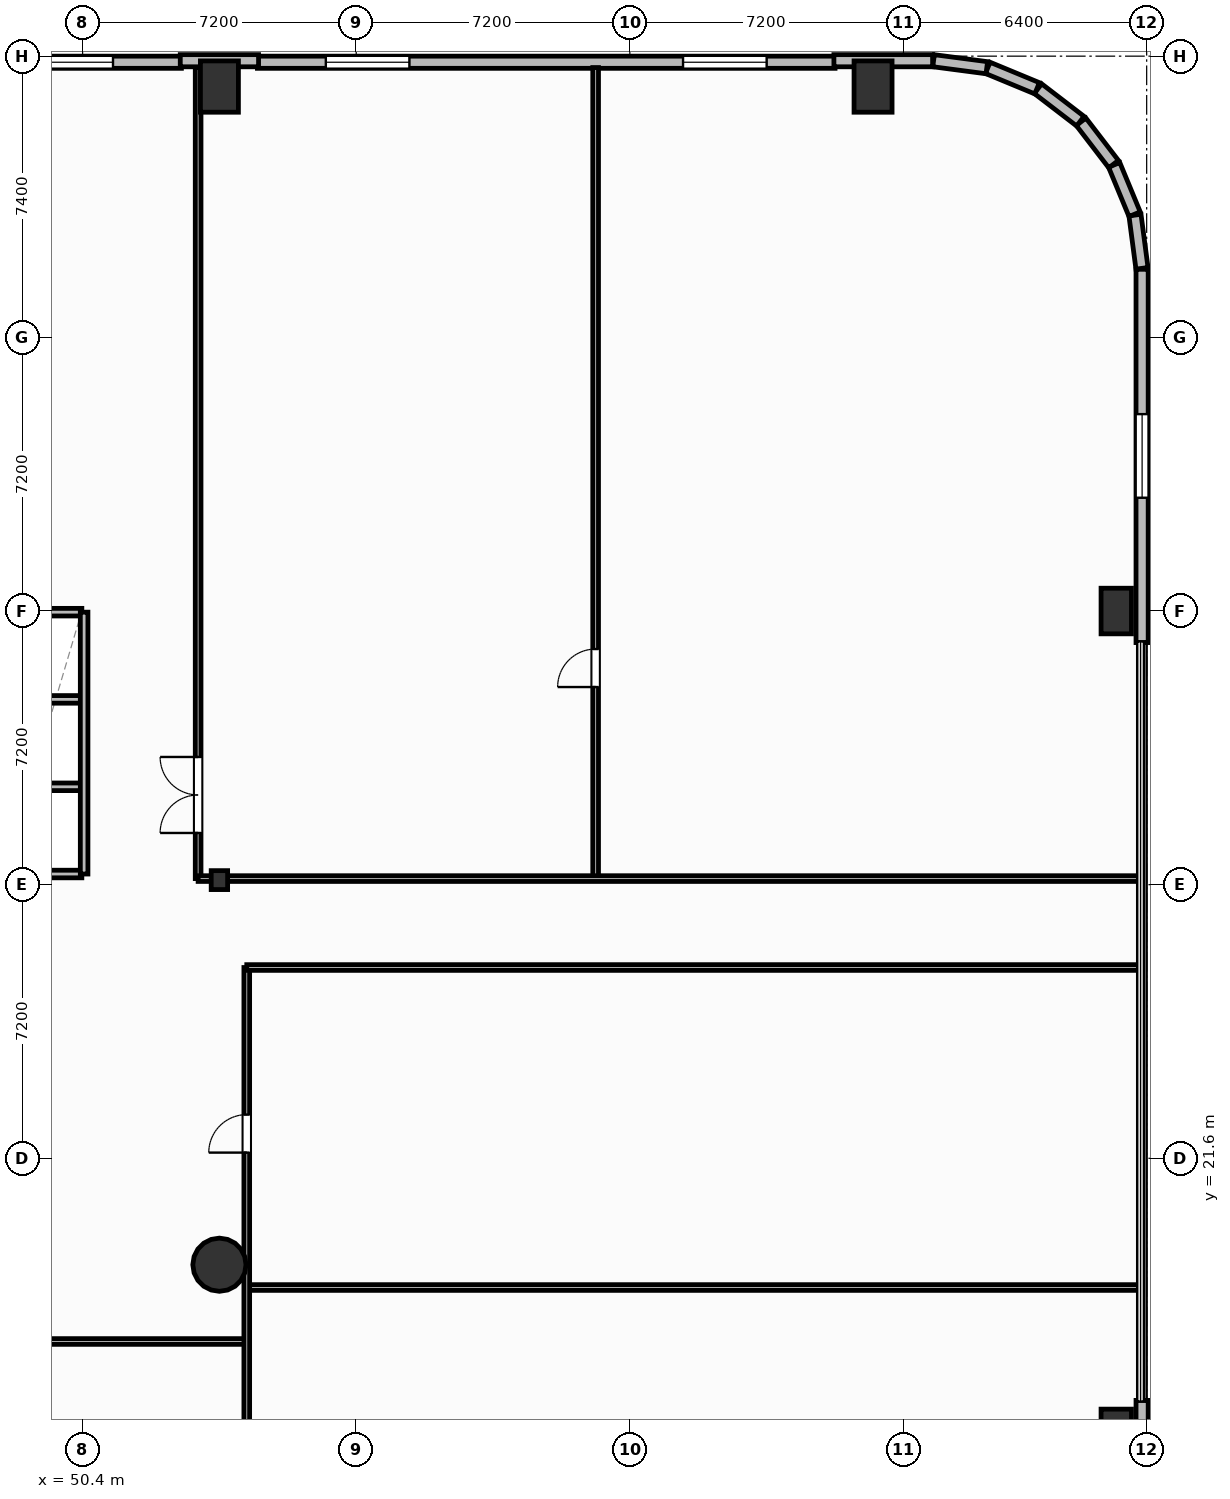
"""IFC4 building model, lengths in metres.
Left out: names, types, materials, properties, quantities, classifications, styles, units other than length and angle.
Written with IfcOpenShell. Run it as: python <this file> out.ifc"""

import sys

from ifc_helpers import new_model, si_unit, direction, frame, frame_2d, origin, origin_2d, place, context, subcontext, project, spatial, rectangle, circle, i_section, extrude, element, fill, save


model = new_model("IFC4")
c1 = context("Model", 3, precision=1e-05, world=origin(), true_north=direction((0.0, 1.0)))
c2 = subcontext(c1, "Body", "Model", "MODEL_VIEW")
j1 = project(units=[si_unit("LENGTHUNIT", "METRE"), si_unit("PLANEANGLEUNIT", "RADIAN")], contexts=[c1])
p1 = place(None, origin())
s1 = spatial("IfcSite", under=j1, at=p1, CompositionType="ELEMENT")
p2 = place(p1, origin())
s2 = spatial("IfcBuilding", under=s1, at=p2, CompositionType="ELEMENT")
p3 = place(p2, frame((0.0, 0.0, 21.6)))
s3 = spatial("IfcBuildingStorey", under=s2, at=p3, CompositionType="ELEMENT", Elevation=21.6)
p4 = place(p3, frame((54.0, 28.92, 0.0), z_axis=(0.0, 0.0, 1.0), x_axis=(1.0, 0.0, 0.0)))
e1 = element("IfcColumn", 1, at=p4, inside=s3, PredefinedType="COLUMN", context=c2, shape_type="SweptSolid", body=[
    extrude(i_section(OverallWidth=0.432, OverallDepth=0.498, WebThickness=0.056, FlangeThickness=0.089, FilletRadius=0.025, at=origin_2d()), origin(), (0.0, 0.0, 1.0), 5.4),
])
p5 = place(p3, frame((54.0, 18.8, 0.0), z_axis=(0.0, 0.0, 1.0), x_axis=(1.0, 0.0, 0.0)))
e2 = element("IfcColumn", 2, at=p5, inside=s3, PredefinedType="COLUMN", context=c2, shape_type="SweptSolid", body=[
    extrude(circle(Radius=0.7, at=origin_2d()), origin(), (0.0, 0.0, 1.0), 5.4),
])
for number, where, z_axis, x_axis in (
    (3, (54.0, 49.8, 0.0), (0.0, 0.0, 1.0), (1.0, 0.0, 0.0)),
    (4, (71.2, 49.8, 0.0), (0.0, 0.0, 1.0), (1.0, 0.0, 0.0)),
):
    element("IfcColumn", number, at=place(p3, frame(where, z_axis=z_axis, x_axis=x_axis)), inside=s3, PredefinedType="COLUMN", context=c2, shape_type="SweptSolid", body=[
        extrude(rectangle(XDim=1.0, YDim=1.35, at=origin_2d()), origin(), (0.0, 0.0, 1.0), 5.4),
    ])
for number, where, z_axis, x_axis in (
    (5, (77.6, 14.4, 0.0), (0.0, 0.0, 1.0), (1.0, 0.0, 0.0)),
    (6, (77.6, 36.0, 0.0), (0.0, 0.0, 1.0), (1.0, 0.0, 0.0)),
):
    element("IfcColumn", number, at=place(p3, frame(where, z_axis=z_axis, x_axis=x_axis)), inside=s3, PredefinedType="PILASTER", context=c2, shape_type="SweptSolid", body=[
        extrude(rectangle(XDim=0.8, YDim=1.2, at=origin_2d()), origin(), (0.0, 0.0, 1.0), 5.4),
    ])
p6 = place(p3, frame((25.4, 50.44, 0.0), z_axis=(0.0, 0.0, 1.0), x_axis=(1.0, 0.0, 0.0)))
e7 = element("IfcWall", 7, at=p6, inside=s3, PredefinedType="SOLIDWALL", context=c2, shape_type="SweptSolid", body=[
    extrude(rectangle(XDim=27.6, YDim=0.32, at=frame_2d((13.8, 0.0))), origin(), (0.0, 0.0, 1.0), 4.1),
])
p7 = place(p6, frame((1.8, 0.0, 0.8)))
e8 = element("IfcOpeningElement", 8, at=p7, cuts=e7, PredefinedType="OPENING", context=c2, shape_type="SweptSolid", body=[
    extrude(rectangle(XDim=2.2, YDim=1.11, at=frame_2d((1.1, 0.555))), frame((0.0, 0.17, 0.0), z_axis=(0.0, -1.0, 0.0), x_axis=(1.0, 0.0, 0.0)), (0.0, 0.0, 1.0), 0.34),
])
p8 = place(p6, frame((23.6, 0.0, 0.8)))
e9 = element("IfcOpeningElement", 9, at=p8, cuts=e7, PredefinedType="OPENING", context=c2, shape_type="SweptSolid", body=[
    extrude(rectangle(XDim=2.2, YDim=1.11, at=frame_2d((1.1, 0.555))), frame((0.0, 0.17, 0.0), z_axis=(0.0, -1.0, 0.0), x_axis=(1.0, 0.0, 0.0)), (0.0, 0.0, 1.0), 0.34),
])
p9 = place(p3, frame((55.0, 50.44, 0.0), z_axis=(0.0, 0.0, 1.0), x_axis=(1.0, 0.0, 0.0)))
e10 = element("IfcWall", 10, at=p9, inside=s3, PredefinedType="SOLIDWALL", context=c2, shape_type="SweptSolid", body=[
    extrude(rectangle(XDim=15.2, YDim=0.32, at=frame_2d((7.6, 0.0))), origin(), (0.0, 0.0, 1.0), 4.1),
])
p10 = place(p9, frame((1.8, 0.0, 0.8)))
e11 = element("IfcOpeningElement", 11, at=p10, cuts=e10, PredefinedType="OPENING", context=c2, shape_type="SweptSolid", body=[
    extrude(rectangle(XDim=2.2, YDim=1.11, at=frame_2d((1.1, 0.555))), frame((0.0, 0.17, 0.0), z_axis=(0.0, -1.0, 0.0), x_axis=(1.0, 0.0, 0.0)), (0.0, 0.0, 1.0), 0.34),
])
p11 = place(p9, frame((11.2, 0.0, 0.8)))
e12 = element("IfcOpeningElement", 12, at=p11, cuts=e10, PredefinedType="OPENING", context=c2, shape_type="SweptSolid", body=[
    extrude(rectangle(XDim=2.2, YDim=1.11, at=frame_2d((1.1, 0.555))), frame((0.0, 0.17, 0.0), z_axis=(0.0, -1.0, 0.0), x_axis=(1.0, 0.0, 0.0)), (0.0, 0.0, 1.0), 0.34),
])
p12 = place(p3, frame((78.28, 5.633, 0.0), z_axis=(0.0, 0.0, 1.0), x_axis=(0.0, 1.0, 0.0)))
e13 = element("IfcWall", 13, at=p12, inside=s3, PredefinedType="SOLIDWALL", context=c2, shape_type="SweptSolid", body=[
    extrude(rectangle(XDim=9.597, YDim=0.32, at=frame_2d((4.799, 0.0))), origin(), (0.0, 0.0, 1.0), 4.1),
])
p13 = place(p12, frame((3.698, 0.0, 0.8)))
e14 = element("IfcOpeningElement", 14, at=p13, cuts=e13, PredefinedType="OPENING", context=c2, shape_type="SweptSolid", body=[
    extrude(rectangle(XDim=2.2, YDim=2.0, at=frame_2d((1.1, 1.0))), frame((0.0, 0.17, 0.0), z_axis=(0.0, -1.0, 0.0), x_axis=(1.0, 0.0, 0.0)), (0.0, 0.0, 1.0), 0.34),
])
p14 = place(p3, frame((78.28, 35.17, 0.0), z_axis=(0.0, 0.0, 1.0), x_axis=(0.0, 1.0, 0.0)))
e15 = element("IfcWall", 15, at=p14, inside=s3, PredefinedType="SOLIDWALL", context=c2, shape_type="SweptSolid", body=[
    extrude(rectangle(XDim=9.822, YDim=0.32, at=frame_2d((4.911, 0.0))), origin(), (0.0, 0.0, 1.0), 4.1),
])
p15 = place(p14, frame((3.811, 0.0, 0.8)))
e16 = element("IfcOpeningElement", 16, at=p15, cuts=e15, PredefinedType="OPENING", context=c2, shape_type="SweptSolid", body=[
    extrude(rectangle(XDim=2.2, YDim=2.0, at=frame_2d((1.1, 1.0))), frame((0.0, 0.17, 0.0), z_axis=(0.0, -1.0, 0.0), x_axis=(1.0, 0.0, 0.0)), (0.0, 0.0, 1.0), 0.34),
])
p16 = place(p3, frame((78.277, 45.017, 0.0), z_axis=(0.0, 0.0, 1.0), x_axis=(-0.130409831203, 0.991460173646, 0.0)))
e17 = element("IfcWall", 17, at=p16, inside=s3, PredefinedType="SOLIDWALL", context=c2, shape_type="SweptSolid", body=[
    extrude(rectangle(XDim=1.413, YDim=0.32, at=frame_2d((0.707, 0.0))), origin(), (0.0, 0.0, 1.0), 4.1),
])
for number, where, z_axis, x_axis in (
    (18, (78.083, 46.441, 0.0), (0.0, 0.0, 1.0), (-0.383, 0.924, 0.0)),
    (19, (77.53, 47.759, 0.0), (0.0, 0.0, 1.0), (-0.609, 0.793, 0.0)),
    (20, (76.654, 48.889, 0.0), (0.0, 0.0, 1.0), (-0.793, 0.609, 0.0)),
    (21, (75.516, 49.754, 0.0), (0.0, 0.0, 1.0), (-0.924, 0.383, 0.0)),
):
    element("IfcWall", number, at=place(p3, frame(where, z_axis=z_axis, x_axis=x_axis)), inside=s3, PredefinedType="SOLIDWALL", context=c2, shape_type="SweptSolid", body=[
        extrude(rectangle(XDim=1.405, YDim=0.32, at=frame_2d((0.703, 0.0))), origin(), (0.0, 0.0, 1.0), 4.1),
    ])
p17 = place(p3, frame((74.193, 50.296, 0.0), z_axis=(0.0, 0.0, 1.0), x_axis=(-0.991460173646, 0.130409831203, 0.0)))
e22 = element("IfcWall", 22, at=p17, inside=s3, PredefinedType="SOLIDWALL", context=c2, shape_type="SweptSolid", body=[
    extrude(rectangle(XDim=1.413, YDim=0.32, at=frame_2d((0.707, 0.0))), origin(), (0.0, 0.0, 1.0), 4.1),
])
p18 = place(p3, frame((72.767, 50.48, 0.0), z_axis=(0.0, 0.0, 1.0), x_axis=(-1.0, 0.0, 0.0)))
e23 = element("IfcWall", 23, at=p18, inside=s3, PredefinedType="SOLIDWALL", context=c2, shape_type="SweptSolid", body=[
    extrude(rectangle(XDim=2.597, YDim=0.32, at=frame_2d((1.299, 0.0))), origin(), (0.0, 0.0, 1.0), 4.1),
])
p19 = place(p3, frame((55.03, 50.48, 0.0), z_axis=(0.0, 0.0, 1.0), x_axis=(-1.0, 0.0, 0.0)))
e24 = element("IfcWall", 24, at=p19, inside=s3, PredefinedType="SOLIDWALL", context=c2, shape_type="SweptSolid", body=[
    extrude(rectangle(XDim=2.06, YDim=0.32, at=frame_2d((1.03, 0.0))), origin(), (0.0, 0.0, 1.0), 4.1),
])
p20 = place(p3, frame((54.72, 18.2, 0.0), z_axis=(0.0, 0.0, 1.0), x_axis=(1.0, 0.0, 0.0)))
e25 = element("IfcWall", 25, at=p20, inside=s3, PredefinedType="PARTITIONING", context=c2, shape_type="SweptSolid", body=[
    extrude(rectangle(XDim=23.48, YDim=0.15, at=frame_2d((11.74, 0.0))), origin(), (0.0, 0.0, 1.0), 1.935),
])
p21 = place(p3, frame((63.9, 28.96, 0.0), z_axis=(0.0, 0.0, 1.0), x_axis=(0.0, 1.0, 0.0)))
e26 = element("IfcWall", 26, at=p21, inside=s3, PredefinedType="PARTITIONING", context=c2, shape_type="SweptSolid", body=[
    extrude(rectangle(XDim=21.34, YDim=0.15, at=frame_2d((10.67, 0.0))), origin(), (0.0, 0.0, 1.0), 5.15),
])
p22 = place(p21, frame((5.04, 0.0, 0.0)))
e27 = element("IfcOpeningElement", 27, at=p22, cuts=e26, PredefinedType="OPENING", context=c2, shape_type="SweptSolid", body=[
    extrude(rectangle(XDim=1.0, YDim=2.05, at=frame_2d((0.5, 1.025))), frame((0.0, 0.085, 0.0), z_axis=(0.0, -1.0, 0.0), x_axis=(1.0, 0.0, 0.0)), (0.0, 0.0, 1.0), 0.17),
])
p23 = place(p3, frame((23.68, 16.78, 0.0), z_axis=(0.0, 0.0, 1.0), x_axis=(1.0, 0.0, 0.0)))
e28 = element("IfcWall", 28, at=p23, inside=s3, PredefinedType="PARTITIONING", context=c2, shape_type="SweptSolid", body=[
    extrude(rectangle(XDim=31.04, YDim=0.15, at=frame_2d((15.52, 0.0))), origin(), (0.0, 0.0, 1.0), 5.15),
])
p24 = place(p23, frame((6.5, 0.0, 0.0)))
e29 = element("IfcOpeningElement", 29, at=p24, cuts=e28, PredefinedType="OPENING", context=c2, shape_type="SweptSolid", body=[
    extrude(rectangle(XDim=1.0, YDim=2.05, at=frame_2d((0.5, 1.025))), frame((0.0, 0.085, 0.0), z_axis=(0.0, -1.0, 0.0), x_axis=(1.0, 0.0, 0.0)), (0.0, 0.0, 1.0), 0.17),
])
p25 = place(p23, frame((21.0, 0.0, 0.0)))
e30 = element("IfcOpeningElement", 30, at=p25, cuts=e28, PredefinedType="OPENING", context=c2, shape_type="SweptSolid", body=[
    extrude(rectangle(XDim=1.0, YDim=2.05, at=frame_2d((0.5, 1.025))), frame((0.0, 0.085, 0.0), z_axis=(0.0, -1.0, 0.0), x_axis=(1.0, 0.0, 0.0)), (0.0, 0.0, 1.0), 0.17),
])
p26 = place(p3, frame((54.72, 0.25, 0.0), z_axis=(0.0, 0.0, 1.0), x_axis=(0.0, 1.0, 0.0)))
e31 = element("IfcWall", 31, at=p26, inside=s3, PredefinedType="PARTITIONING", context=c2, shape_type="SweptSolid", body=[
    extrude(rectangle(XDim=26.37, YDim=0.15, at=frame_2d((13.185, 0.0))), origin(), (0.0, 0.0, 1.0), 5.15),
])
p27 = place(p26, frame((21.5, 0.0, 0.0)))
e32 = element("IfcOpeningElement", 32, at=p27, cuts=e31, PredefinedType="OPENING", context=c2, shape_type="SweptSolid", body=[
    extrude(rectangle(XDim=1.0, YDim=2.05, at=frame_2d((0.5, 1.025))), frame((0.0, 0.085, 0.0), z_axis=(0.0, -1.0, 0.0), x_axis=(1.0, 0.0, 0.0)), (0.0, 0.0, 1.0), 0.17),
])
p28 = place(p26, frame((13.2, 0.0, 0.0)))
e33 = element("IfcOpeningElement", 33, at=p28, cuts=e31, PredefinedType="OPENING", context=c2, shape_type="SweptSolid", body=[
    extrude(rectangle(XDim=1.0, YDim=2.05, at=frame_2d((0.5, 1.025))), frame((0.0, 0.085, 0.0), z_axis=(0.0, -1.0, 0.0), x_axis=(1.0, 0.0, 0.0)), (0.0, 0.0, 1.0), 0.17),
])
p29 = place(p3, frame((54.72, 26.62, 0.0), z_axis=(0.0, 0.0, 1.0), x_axis=(1.0, 0.0, 0.0)))
e34 = element("IfcWall", 34, at=p29, inside=s3, PredefinedType="PARTITIONING", context=c2, shape_type="SweptSolid", body=[
    extrude(rectangle(XDim=23.48, YDim=0.15, at=frame_2d((11.74, 0.0))), origin(), (0.0, 0.0, 1.0), 5.15),
])
p30 = place(p3, frame((53.44, 28.96, 0.0), z_axis=(0.0, 0.0, 1.0), x_axis=(0.0, 1.0, 0.0)))
e35 = element("IfcWall", 35, at=p30, inside=s3, PredefinedType="PARTITIONING", context=c2, shape_type="SweptSolid", body=[
    extrude(rectangle(XDim=21.34, YDim=0.15, at=frame_2d((10.67, 0.0))), origin(), (0.0, 0.0, 1.0), 5.15),
])
p31 = place(p30, frame((1.2, 0.0, 0.0)))
e36 = element("IfcOpeningElement", 36, at=p31, cuts=e35, PredefinedType="OPENING", context=c2, shape_type="SweptSolid", body=[
    extrude(rectangle(XDim=2.0, YDim=2.05, at=frame_2d((1.0, 1.025))), frame((0.0, 0.085, 0.0), z_axis=(0.0, -1.0, 0.0), x_axis=(1.0, 0.0, 0.0)), (0.0, 0.0, 1.0), 0.17),
])
p32 = place(p3, frame((53.44, 28.96, 0.0), z_axis=(0.0, 0.0, 1.0), x_axis=(1.0, 0.0, 0.0)))
e37 = element("IfcWall", 37, at=p32, inside=s3, PredefinedType="PARTITIONING", context=c2, shape_type="SweptSolid", body=[
    extrude(rectangle(XDim=24.76, YDim=0.15, at=frame_2d((12.38, 0.0))), origin(), (0.0, 0.0, 1.0), 1.935),
])
for number, where, z_axis, x_axis in (
    (38, (48.32, 31.375, 0.0), (0.0, 0.0, 1.0), (1.0, 0.0, 0.0)),
    (39, (48.32, 33.675, 0.0), (0.0, 0.0, 1.0), (1.0, 0.0, 0.0)),
):
    element("IfcWall", number, at=place(p3, frame(where, z_axis=z_axis, x_axis=x_axis)), inside=s3, PredefinedType="PARTITIONING", context=c2, shape_type="SweptSolid", body=[
        extrude(rectangle(XDim=2.06, YDim=0.2, at=frame_2d((1.03, 0.0))), origin(), (0.0, 0.0, 1.0), 5.15),
    ])
p33 = place(p3, frame((48.32, 29.08, 0.0), z_axis=(0.0, 0.0, 1.0), x_axis=(1.0, 0.0, 0.0)))
e40 = element("IfcWall", 40, at=p33, inside=s3, PredefinedType="PARTITIONING", context=c2, shape_type="SweptSolid", body=[
    extrude(rectangle(XDim=2.06, YDim=0.2, at=frame_2d((1.03, 0.0))), origin(), (0.0, 0.0, 1.0), 4.362),
])
p34 = place(p3, frame((48.32, 35.97, 0.0), z_axis=(0.0, 0.0, 1.0), x_axis=(1.0, 0.0, 0.0)))
e41 = element("IfcWall", 41, at=p34, inside=s3, PredefinedType="PARTITIONING", context=c2, shape_type="SweptSolid", body=[
    extrude(rectangle(XDim=2.06, YDim=0.2, at=frame_2d((1.03, 0.0))), origin(), (0.0, 0.0, 1.0), 5.15),
])
p35 = place(p3, frame((50.44, 29.08, 0.0), z_axis=(0.0, 0.0, 1.0), x_axis=(0.0, 1.0, 0.0)))
e42 = element("IfcWall", 42, at=p35, inside=s3, PredefinedType="PARTITIONING", context=c2, shape_type="SweptSolid", body=[
    extrude(rectangle(XDim=6.89, YDim=0.2, at=frame_2d((3.445, 0.0))), origin(), (0.0, 0.0, 1.0), 5.15),
])
p36 = place(p8, origin())
e43 = element("IfcWindow", 43, at=p36, inside=s3, PartitioningType="SINGLE_PANEL", PredefinedType="WINDOW", context=c2, shape_type="SweptSolid", body=[
    extrude(rectangle(XDim=2.2, YDim=1.11, at=frame_2d((1.1, 0.555))), frame((0.0, 0.03, 0.0), z_axis=(0.0, -1.0, 0.0), x_axis=(1.0, 0.0, 0.0)), (0.0, 0.0, 1.0), 0.06),
])
fill(e9, e43)
p37 = place(p10, origin())
e44 = element("IfcWindow", 44, at=p37, inside=s3, PartitioningType="SINGLE_PANEL", PredefinedType="WINDOW", context=c2, shape_type="SweptSolid", body=[
    extrude(rectangle(XDim=2.2, YDim=1.11, at=frame_2d((1.1, 0.555))), frame((0.0, 0.03, 0.0), z_axis=(0.0, -1.0, 0.0), x_axis=(1.0, 0.0, 0.0)), (0.0, 0.0, 1.0), 0.06),
])
fill(e11, e44)
p38 = place(p11, origin())
e45 = element("IfcWindow", 45, at=p38, inside=s3, PartitioningType="SINGLE_PANEL", PredefinedType="WINDOW", context=c2, shape_type="SweptSolid", body=[
    extrude(rectangle(XDim=2.2, YDim=1.11, at=frame_2d((1.1, 0.555))), frame((0.0, 0.03, 0.0), z_axis=(0.0, -1.0, 0.0), x_axis=(1.0, 0.0, 0.0)), (0.0, 0.0, 1.0), 0.06),
])
fill(e12, e45)
p39 = place(p15, origin())
e46 = element("IfcWindow", 46, at=p39, inside=s3, PartitioningType="SINGLE_PANEL", PredefinedType="WINDOW", context=c2, shape_type="SweptSolid", body=[
    extrude(rectangle(XDim=2.2, YDim=2.0, at=frame_2d((1.1, 1.0))), frame((0.0, 0.03, 0.0), z_axis=(0.0, -1.0, 0.0), x_axis=(1.0, 0.0, 0.0)), (0.0, 0.0, 1.0), 0.06),
])
fill(e16, e46)
p40 = place(p22, origin())
e47 = element("IfcDoor", 47, at=p40, inside=s3, OperationType="SINGLE_SWING_LEFT", PredefinedType="DOOR", context=c2, shape_type="SweptSolid", body=[
    extrude(rectangle(XDim=1.0, YDim=2.05, at=frame_2d((0.5, 1.025))), frame((0.0, 0.025, 0.0), z_axis=(0.0, -1.0, 0.0), x_axis=(1.0, 0.0, 0.0)), (0.0, 0.0, 1.0), 0.05),
])
fill(e27, e47)
p41 = place(p27, origin())
e48 = element("IfcDoor", 48, at=p41, inside=s3, OperationType="SINGLE_SWING_LEFT", PredefinedType="DOOR", context=c2, shape_type="SweptSolid", body=[
    extrude(rectangle(XDim=1.0, YDim=2.05, at=frame_2d((0.5, 1.025))), frame((0.0, 0.025, 0.0), z_axis=(0.0, -1.0, 0.0), x_axis=(1.0, 0.0, 0.0)), (0.0, 0.0, 1.0), 0.05),
])
fill(e32, e48)
p42 = place(p31, origin())
e49 = element("IfcDoor", 49, at=p42, inside=s3, OperationType="DOUBLE_DOOR_SINGLE_SWING", PredefinedType="DOOR", context=c2, shape_type="SweptSolid", body=[
    extrude(rectangle(XDim=2.0, YDim=2.05, at=frame_2d((1.0, 1.025))), frame((0.0, 0.025, 0.0), z_axis=(0.0, -1.0, 0.0), x_axis=(1.0, 0.0, 0.0)), (0.0, 0.0, 1.0), 0.05),
])
fill(e36, e49)
save(model, sys.argv[1])
